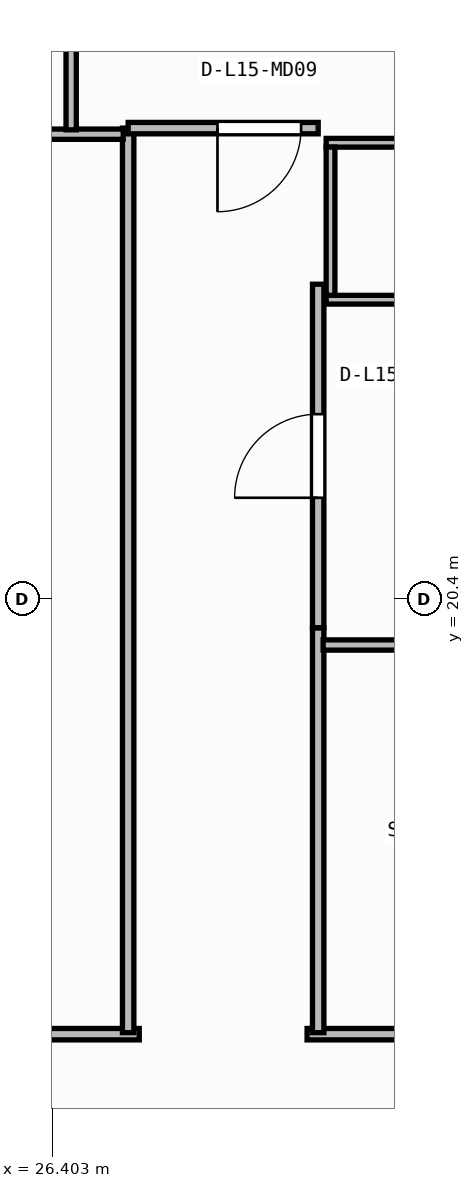
"""IFC4 building model, lengths in metres.
Left out: names, types, materials, properties, quantities, classifications, styles, units other than length and angle.
Written with IfcOpenShell. Run it as: python <this file> out.ifc"""

import sys

from ifc_helpers import new_model, si_unit, direction, frame, frame_2d, origin, place, context, subcontext, project, spatial, rectangle, extrude, element, fill, save


model = new_model("IFC4")
c1 = context("Model", 3, precision=1e-05, world=origin(), true_north=direction((0.0, 1.0)))
c2 = subcontext(c1, "Body", "Model", "MODEL_VIEW")
j1 = project(units=[si_unit("LENGTHUNIT", "METRE"), si_unit("PLANEANGLEUNIT", "RADIAN")], contexts=[c1])
p1 = place(None, origin())
s1 = spatial("IfcSite", under=j1, at=p1, CompositionType="ELEMENT")
p2 = place(p1, origin())
s2 = spatial("IfcBuilding", under=s1, at=p2, CompositionType="ELEMENT")
p3 = place(p2, frame((0.0, 0.0, 62.0)))
s3 = spatial("IfcBuildingStorey", under=s2, at=p3, CompositionType="ELEMENT", Elevation=62.0)
p4 = place(p3, frame((30.005, 24.343, 0.0), z_axis=(0.0, 0.0, 1.0), x_axis=(1.0, 0.0, 0.0)))
e1 = element("IfcWall", 1, at=p4, inside=s3, PredefinedType="PARTITIONING", context=c2, shape_type="SweptSolid", body=[
    extrude(rectangle(XDim=2.15, YDim=0.115, at=frame_2d((1.075, 0.0))), origin(), (0.0, 0.0, 1.0), 3.381),
])
p5 = place(p3, frame((30.005, 26.407, 0.0), z_axis=(0.0, 0.0, 1.0), x_axis=(1.0, 0.0, 0.0)))
e2 = element("IfcWall", 2, at=p5, inside=s3, PredefinedType="PARTITIONING", context=c2, shape_type="SweptSolid", body=[
    extrude(rectangle(XDim=2.15, YDim=0.115, at=frame_2d((1.075, 0.0))), origin(), (0.0, 0.0, 1.0), 3.71),
])
p6 = place(p3, frame((30.062, 24.4, 0.0), z_axis=(0.0, 0.0, 1.0), x_axis=(0.0, 1.0, 0.0)))
e3 = element("IfcWall", 3, at=p6, inside=s3, PredefinedType="PARTITIONING", context=c2, shape_type="SweptSolid", body=[
    extrude(rectangle(XDim=1.95, YDim=0.115, at=frame_2d((0.975, 0.0))), origin(), (0.0, 0.0, 1.0), 3.71),
])
p7 = place(p3, frame((27.546, 14.68, 0.0), z_axis=(0.0, 0.0, 1.0), x_axis=(-1.0, 0.0, 0.0)))
e4 = element("IfcWall", 4, at=p7, inside=s3, PredefinedType="PARTITIONING", context=c2, shape_type="SweptSolid", body=[
    extrude(rectangle(XDim=15.328, YDim=0.15, at=frame_2d((7.664, 0.0))), origin(), (0.0, 0.0, 1.0), 3.71),
])
p8 = place(p7, frame((7.114, 0.0, 0.0)))
e5 = element("IfcOpeningElement", 5, at=p8, cuts=e4, PredefinedType="OPENING", context=c2, shape_type="SweptSolid", body=[
    extrude(rectangle(XDim=1.1, YDim=2.1, at=frame_2d((0.55, 1.05))), frame((0.0, 0.085, 0.0), z_axis=(0.0, -1.0, 0.0), x_axis=(1.0, 0.0, 0.0)), (0.0, 0.0, 1.0), 0.17),
])
p9 = place(p3, frame((45.816, 14.68, 0.0), z_axis=(0.0, 0.0, 1.0), x_axis=(-1.0, 0.0, 0.0)))
e6 = element("IfcWall", 6, at=p9, inside=s3, PredefinedType="PARTITIONING", context=c2, shape_type="SweptSolid", body=[
    extrude(rectangle(XDim=16.062, YDim=0.15, at=frame_2d((8.031, 0.0))), origin(), (0.0, 0.0, 1.0), 3.71),
])
p10 = place(p9, frame((7.481, 0.0, 0.0)))
e7 = element("IfcOpeningElement", 7, at=p10, cuts=e6, PredefinedType="OPENING", context=c2, shape_type="SweptSolid", body=[
    extrude(rectangle(XDim=1.1, YDim=2.1, at=frame_2d((0.55, 1.05))), frame((0.0, 0.085, 0.0), z_axis=(0.0, -1.0, 0.0), x_axis=(1.0, 0.0, 0.0)), (0.0, 0.0, 1.0), 0.17),
])
p11 = place(p3, frame((27.4, 26.6, 0.0), z_axis=(0.0, 0.0, 1.0), x_axis=(0.0, -1.0, 0.0)))
e8 = element("IfcWall", 8, at=p11, inside=s3, PredefinedType="PARTITIONING", context=c2, shape_type="SweptSolid", body=[
    extrude(rectangle(XDim=11.9, YDim=0.15, at=frame_2d((5.95, 0.0))), origin(), (0.0, 0.0, 1.0), 3.71),
])
p12 = place(p3, frame((29.9, 14.7, 0.0), z_axis=(0.0, 0.0, 1.0), x_axis=(0.0, 1.0, 0.0)))
e9 = element("IfcWall", 9, at=p12, inside=s3, PredefinedType="PARTITIONING", context=c2, shape_type="SweptSolid", body=[
    extrude(rectangle(XDim=5.326, YDim=0.15, at=frame_2d((2.663, 0.0))), origin(), (0.0, 0.0, 1.0), 3.71),
])
p13 = place(p3, frame((29.9, 20.028, 0.0), z_axis=(0.0, 0.0, 1.0), x_axis=(0.0, 1.0, 0.0)))
e10 = element("IfcWall", 10, at=p13, inside=s3, PredefinedType="PARTITIONING", context=c2, shape_type="SweptSolid", body=[
    extrude(rectangle(XDim=4.518, YDim=0.15, at=frame_2d((2.259, 0.0))), origin(), (0.0, 0.0, 1.0), 3.71),
])
p14 = place(p13, frame((1.709, 0.0, 0.0)))
e11 = element("IfcOpeningElement", 11, at=p14, cuts=e10, PredefinedType="OPENING", context=c2, shape_type="SweptSolid", body=[
    extrude(rectangle(XDim=1.1, YDim=2.1, at=frame_2d((0.55, 1.05))), frame((0.0, 0.085, 0.0), z_axis=(0.0, -1.0, 0.0), x_axis=(1.0, 0.0, 0.0)), (0.0, 0.0, 1.0), 0.17),
])
p15 = place(p3, frame((29.9, 26.6, 0.0), z_axis=(0.0, 0.0, 1.0), x_axis=(-1.0, 0.0, 0.0)))
e12 = element("IfcWall", 12, at=p15, inside=s3, PredefinedType="PARTITIONING", context=c2, shape_type="SweptSolid", body=[
    extrude(rectangle(XDim=2.5, YDim=0.15, at=frame_2d((1.25, 0.0))), origin(), (0.0, 0.0, 1.0), 3.71),
])
p16 = place(p15, frame((0.225, 0.0, 0.0)))
e13 = element("IfcOpeningElement", 13, at=p16, cuts=e12, PredefinedType="OPENING", context=c2, shape_type="SweptSolid", body=[
    extrude(rectangle(XDim=1.1, YDim=2.1, at=frame_2d((0.55, 1.05))), frame((0.0, 0.085, 0.0), z_axis=(0.0, -1.0, 0.0), x_axis=(1.0, 0.0, 0.0)), (0.0, 0.0, 1.0), 0.17),
])
p17 = place(p3, frame((27.335, 26.52, 0.0), z_axis=(0.0, 0.0, 1.0), x_axis=(-1.0, 0.0, 0.0)))
e14 = element("IfcWall", 14, at=p17, inside=s3, PredefinedType="PARTITIONING", context=c2, shape_type="SweptSolid", body=[
    extrude(rectangle(XDim=6.118, YDim=0.135, at=frame_2d((3.059, 0.0))), origin(), (0.0, 0.0, 1.0), 3.71),
])
p18 = place(p17, frame((4.703, 0.0, 0.0)))
e15 = element("IfcOpeningElement", 15, at=p18, cuts=e14, PredefinedType="OPENING", context=c2, shape_type="SweptSolid", body=[
    extrude(rectangle(XDim=1.1, YDim=2.1, at=frame_2d((0.55, 1.05))), frame((0.0, 0.077, 0.0), z_axis=(0.0, -1.0, 0.0), x_axis=(1.0, 0.0, 0.0)), (0.0, 0.0, 1.0), 0.155),
])
p19 = place(p3, frame((34.775, 19.8, 0.0), z_axis=(0.0, 0.0, 1.0), x_axis=(-1.0, 0.0, 0.0)))
e16 = element("IfcWall", 16, at=p19, inside=s3, PredefinedType="PARTITIONING", context=c2, shape_type="SweptSolid", body=[
    extrude(rectangle(XDim=4.81, YDim=0.135, at=frame_2d((2.405, 0.0))), origin(), (0.0, 0.0, 1.0), 3.71),
])
p20 = place(p3, frame((26.65, 26.577, 0.0), z_axis=(0.0, 0.0, 1.0), x_axis=(0.0, 1.0, 0.0)))
e17 = element("IfcWall", 17, at=p20, inside=s3, PredefinedType="PARTITIONING", context=c2, shape_type="SweptSolid", body=[
    extrude(rectangle(XDim=4.893, YDim=0.135, at=frame_2d((2.447, 0.0))), origin(), (0.0, 0.0, 1.0), 3.71),
])
p21 = place(p14, origin())
e18 = element("IfcDoor", 18, at=p21, inside=s3, OperationType="SINGLE_SWING_LEFT", PredefinedType="DOOR", context=c2, shape_type="SweptSolid", body=[
    extrude(rectangle(XDim=1.1, YDim=2.1, at=frame_2d((0.55, 1.05))), frame((0.0, 0.025, 0.0), z_axis=(0.0, -1.0, 0.0), x_axis=(1.0, 0.0, 0.0)), (0.0, 0.0, 1.0), 0.05),
])
fill(e11, e18)
p22 = place(p16, origin())
e19 = element("IfcDoor", 19, at=p22, inside=s3, OperationType="SINGLE_SWING_RIGHT", PredefinedType="DOOR", context=c2, shape_type="SweptSolid", body=[
    extrude(rectangle(XDim=1.1, YDim=2.1, at=frame_2d((0.55, 1.05))), frame((0.0, 0.025, 0.0), z_axis=(0.0, -1.0, 0.0), x_axis=(1.0, 0.0, 0.0)), (0.0, 0.0, 1.0), 0.05),
])
fill(e13, e19)
save(model, sys.argv[1])
